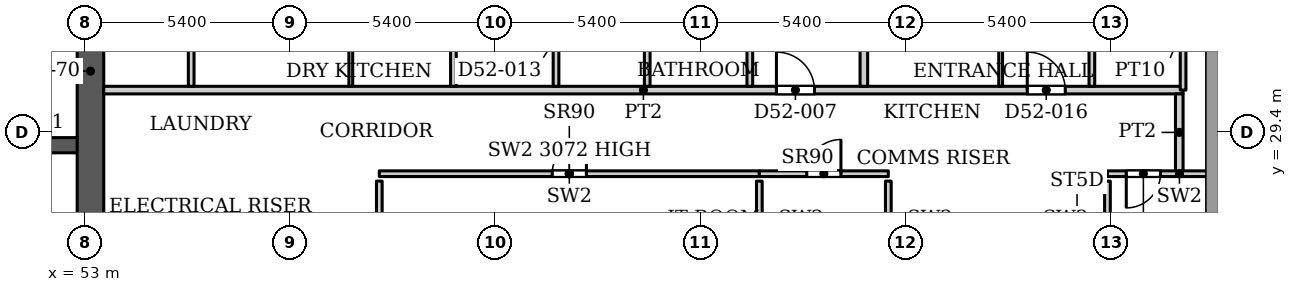
"""IFC4 building model, lengths in metres.
Left out: names, types, materials, properties, quantities, classifications, styles, units other than length and angle.
Written with IfcOpenShell. Run it as: python <this file> out.ifc"""

import sys

from ifc_helpers import new_model, si_unit, direction, frame, frame_2d, origin, place, context, subcontext, project, spatial, rectangle, extrude, source, transform, mapped, element, fill, save


model = new_model("IFC4")
c1 = context("Model", 3, precision=1e-05, world=origin(), true_north=direction((0.0, 1.0)))
c2 = subcontext(c1, "Body", "Model", "MODEL_VIEW")
j1 = project(units=[si_unit("LENGTHUNIT", "METRE"), si_unit("PLANEANGLEUNIT", "RADIAN")], contexts=[c1])
p1 = place(None, origin())
s1 = spatial("IfcSite", under=j1, at=p1, CompositionType="ELEMENT")
p2 = place(p1, origin())
s2 = spatial("IfcBuilding", under=s1, at=p2, CompositionType="ELEMENT")
p3 = place(p2, frame((0.0, 0.0, 224.0)))
s3 = spatial("IfcBuildingStorey", under=s2, at=p3, CompositionType="ELEMENT", Elevation=224.0)
p4 = place(p3, frame((34.75, 29.05, 0.0), z_axis=(0.0, 0.0, 1.0), x_axis=(1.0, 0.0, 0.0)))
e1 = element("IfcWall", 1, at=p4, inside=s3, PredefinedType="SHEAR", context=c2, shape_type="SweptSolid", body=[
    extrude(rectangle(XDim=18.4, YDim=0.4, at=frame_2d((9.2, 0.0))), origin(), (0.0, 0.0, 1.0), 3.9),
])
p5 = place(p4, frame((0.875, 0.0, 0.0)))
e2 = element("IfcOpeningElement", 2, at=p5, cuts=e1, PredefinedType="OPENING", context=c2, shape_type="SweptSolid", body=[
    extrude(rectangle(XDim=1.1, YDim=2.2, at=frame_2d((0.55, 1.1))), frame((0.0, 0.21, 0.0), z_axis=(0.0, -1.0, 0.0), x_axis=(1.0, 0.0, 0.0)), (0.0, 0.0, 1.0), 0.42),
])
p6 = place(p4, frame((3.725, 0.0, 0.0)))
e3 = element("IfcOpeningElement", 3, at=p6, cuts=e1, PredefinedType="OPENING", context=c2, shape_type="SweptSolid", body=[
    extrude(rectangle(XDim=1.1, YDim=2.2, at=frame_2d((0.55, 1.1))), frame((0.0, 0.21, 0.0), z_axis=(0.0, -1.0, 0.0), x_axis=(1.0, 0.0, 0.0)), (0.0, 0.0, 1.0), 0.42),
])
p7 = place(p4, frame((6.575, 0.0, 0.0)))
e4 = element("IfcOpeningElement", 4, at=p7, cuts=e1, PredefinedType="OPENING", context=c2, shape_type="SweptSolid", body=[
    extrude(rectangle(XDim=1.1, YDim=2.2, at=frame_2d((0.55, 1.1))), frame((0.0, 0.21, 0.0), z_axis=(0.0, -1.0, 0.0), x_axis=(1.0, 0.0, 0.0)), (0.0, 0.0, 1.0), 0.42),
])
p8 = place(p4, frame((9.425, 0.0, 0.0)))
e5 = element("IfcOpeningElement", 5, at=p8, cuts=e1, PredefinedType="OPENING", context=c2, shape_type="SweptSolid", body=[
    extrude(rectangle(XDim=1.1, YDim=2.2, at=frame_2d((0.55, 1.1))), frame((0.0, 0.21, 0.0), z_axis=(0.0, -1.0, 0.0), x_axis=(1.0, 0.0, 0.0)), (0.0, 0.0, 1.0), 0.42),
])
p9 = place(p4, frame((12.275, 0.0, 0.0)))
e6 = element("IfcOpeningElement", 6, at=p9, cuts=e1, PredefinedType="OPENING", context=c2, shape_type="SweptSolid", body=[
    extrude(rectangle(XDim=1.1, YDim=2.2, at=frame_2d((0.55, 1.1))), frame((0.0, 0.21, 0.0), z_axis=(0.0, -1.0, 0.0), x_axis=(1.0, 0.0, 0.0)), (0.0, 0.0, 1.0), 0.42),
])
p10 = place(p4, frame((15.125, 0.0, 0.0)))
e7 = element("IfcOpeningElement", 7, at=p10, cuts=e1, PredefinedType="OPENING", context=c2, shape_type="SweptSolid", body=[
    extrude(rectangle(XDim=1.1, YDim=2.2, at=frame_2d((0.55, 1.1))), frame((0.0, 0.21, 0.0), z_axis=(0.0, -1.0, 0.0), x_axis=(1.0, 0.0, 0.0)), (0.0, 0.0, 1.0), 0.42),
])
p11 = place(p3, frame((53.15, 25.8, 0.0), z_axis=(0.0, 0.0, 1.0), x_axis=(0.0, 1.0, 0.0)))
e8 = element("IfcWall", 8, at=p11, inside=s3, PredefinedType="SHEAR", context=c2, shape_type="SweptSolid", body=[
    extrude(rectangle(XDim=10.4, YDim=0.7, at=frame_2d((5.2, 0.0))), origin(), (0.0, 0.0, 1.0), 3.9),
])
p12 = place(p3, frame((60.75, 28.3, 0.0), z_axis=(0.0, 0.0, 1.0), x_axis=(1.0, 0.0, 0.0)))
e9 = element("IfcWall", 9, at=p12, inside=s3, PredefinedType="PARTITIONING", context=c2, shape_type="SweptSolid", body=[
    extrude(rectangle(XDim=10.0, YDim=0.15, at=frame_2d((5.0, 0.0))), origin(), (0.0, 0.0, 1.0), 3.072),
])
p13 = place(p12, frame((4.55, 0.0, 0.0)))
e10 = element("IfcOpeningElement", 10, at=p13, cuts=e9, PredefinedType="OPENING", context=c2, shape_type="SweptSolid", body=[
    extrude(rectangle(XDim=0.9, YDim=2.2, at=frame_2d((0.45, 1.1))), frame((0.0, 0.085, 0.0), z_axis=(0.0, -1.0, 0.0), x_axis=(1.0, 0.0, 0.0)), (0.0, 0.0, 1.0), 0.17),
])
p14 = place(p3, frame((60.75, 23.075, 0.0), z_axis=(0.0, 0.0, 1.0), x_axis=(0.0, 1.0, 0.0)))
e11 = element("IfcWall", 11, at=p14, inside=s3, PredefinedType="PARTITIONING", context=c2, shape_type="SweptSolid", body=[
    extrude(rectangle(XDim=5.03, YDim=0.15, at=frame_2d((2.515, 0.0))), origin(), (0.0, 0.0, 1.0), 3.9),
])
p15 = place(p3, frame((70.75, 26.12, 0.0), z_axis=(0.0, 0.0, 1.0), x_axis=(0.0, 1.0, 0.0)))
e12 = element("IfcWall", 12, at=p15, inside=s3, PredefinedType="PARTITIONING", context=c2, shape_type="SweptSolid", body=[
    extrude(rectangle(XDim=1.985, YDim=0.15, at=frame_2d((0.992, 0.0))), origin(), (0.0, 0.0, 1.0), 3.9),
])
p16 = place(p3, frame((70.75, 28.3, 0.0), z_axis=(0.0, 0.0, 1.0), x_axis=(1.0, 0.0, 0.0)))
e13 = element("IfcWall", 13, at=p16, inside=s3, PredefinedType="PARTITIONING", context=c2, shape_type="SweptSolid", body=[
    extrude(rectangle(XDim=3.394, YDim=0.15, at=frame_2d((1.697, 0.0))), origin(), (0.0, 0.0, 1.0), 3.9),
])
p17 = place(p16, frame((1.247, 0.0, 0.0)))
e14 = element("IfcOpeningElement", 14, at=p17, cuts=e13, PredefinedType="OPENING", context=c2, shape_type="SweptSolid", body=[
    extrude(rectangle(XDim=0.9, YDim=2.2, at=frame_2d((0.45, 1.1))), frame((0.0, 0.085, 0.0), z_axis=(0.0, -1.0, 0.0), x_axis=(1.0, 0.0, 0.0)), (0.0, 0.0, 1.0), 0.17),
])
p18 = place(p3, frame((74.144, 26.12, 0.0), z_axis=(0.0, 0.0, 1.0), x_axis=(0.0, 1.0, 0.0)))
e15 = element("IfcWall", 15, at=p18, inside=s3, PredefinedType="PARTITIONING", context=c2, shape_type="SweptSolid", body=[
    extrude(rectangle(XDim=1.985, YDim=0.15, at=frame_2d((0.992, 0.0))), origin(), (0.0, 0.0, 1.0), 3.9),
])
p19 = place(p3, frame((79.91, 28.3, 0.0), z_axis=(0.0, 0.0, 1.0), x_axis=(1.0, 0.0, 0.0)))
e16 = element("IfcWall", 16, at=p19, inside=s3, PredefinedType="PARTITIONING", context=c2, shape_type="SweptSolid", body=[
    extrude(rectangle(XDim=3.788, YDim=0.15, at=frame_2d((1.894, 0.0))), origin(), (0.0, 0.0, 1.0), 3.9),
])
p20 = place(p19, frame((0.495, 0.0, 0.0)))
e17 = element("IfcOpeningElement", 17, at=p20, cuts=e16, PredefinedType="OPENING", context=c2, shape_type="SweptSolid", body=[
    extrude(rectangle(XDim=0.9, YDim=2.2, at=frame_2d((0.45, 1.1))), frame((0.0, 0.085, 0.0), z_axis=(0.0, -1.0, 0.0), x_axis=(1.0, 0.0, 0.0)), (0.0, 0.0, 1.0), 0.17),
])
p21 = place(p3, frame((79.91, 26.12, 0.0), z_axis=(0.0, 0.0, 1.0), x_axis=(0.0, 1.0, 0.0)))
e18 = element("IfcWall", 18, at=p21, inside=s3, PredefinedType="PARTITIONING", context=c2, shape_type="SweptSolid", body=[
    extrude(rectangle(XDim=1.985, YDim=0.15, at=frame_2d((0.992, 0.0))), origin(), (0.0, 0.0, 1.0), 3.9),
])
p22 = place(p3, frame((53.499, 30.5, 0.0), z_axis=(0.0, 0.0, 1.0), x_axis=(1.0, 0.0, 0.0)))
e19 = element("IfcWall", 19, at=p22, inside=s3, PredefinedType="PARTITIONING", context=c2, shape_type="SweptSolid", body=[
    extrude(rectangle(XDim=28.401, YDim=0.2, at=frame_2d((14.2, 0.0))), origin(), (0.0, 0.0, 1.0), 3.6),
])
p23 = place(p22, frame((17.701, 0.0, 0.0)))
e20 = element("IfcOpeningElement", 20, at=p23, cuts=e19, PredefinedType="OPENING", context=c2, shape_type="SweptSolid", body=[
    extrude(rectangle(XDim=1.0, YDim=2.1, at=frame_2d((0.5, 1.05))), frame((0.0, 0.11, 0.0), z_axis=(0.0, -1.0, 0.0), x_axis=(1.0, 0.0, 0.0)), (0.0, 0.0, 1.0), 0.22),
])
p24 = place(p22, frame((24.301, 0.0, 0.0)))
e21 = element("IfcOpeningElement", 21, at=p24, cuts=e19, PredefinedType="OPENING", context=c2, shape_type="SweptSolid", body=[
    extrude(rectangle(XDim=1.0, YDim=2.1, at=frame_2d((0.5, 1.05))), frame((0.0, 0.11, 0.0), z_axis=(0.0, -1.0, 0.0), x_axis=(1.0, 0.0, 0.0)), (0.0, 0.0, 1.0), 0.22),
])
p25 = place(p3, frame((55.8, 30.6, 0.0), z_axis=(0.0, 0.0, 1.0), x_axis=(0.0, 1.0, 0.0)))
e22 = element("IfcWall", 22, at=p25, inside=s3, PredefinedType="PARTITIONING", context=c2, shape_type="SweptSolid", body=[
    extrude(rectangle(XDim=3.025, YDim=0.15, at=frame_2d((1.512, 0.0))), origin(), (0.0, 0.0, 1.0), 3.6),
])
p26 = place(p3, frame((60.0, 30.6, 0.0), z_axis=(0.0, 0.0, 1.0), x_axis=(0.0, 1.0, 0.0)))
e23 = element("IfcWall", 23, at=p26, inside=s3, PredefinedType="PARTITIONING", context=c2, shape_type="SweptSolid", body=[
    extrude(rectangle(XDim=3.025, YDim=0.1, at=frame_2d((1.512, 0.0))), origin(), (0.0, 0.0, 1.0), 3.6),
])
for number, where, z_axis, x_axis in (
    (24, (62.7, 30.6, 0.0), (0.0, 0.0, 1.0), (0.0, 1.0, 0.0)),
    (25, (65.4, 30.6, 0.0), (0.0, 0.0, 1.0), (0.0, 1.0, 0.0)),
    (26, (67.8, 30.6, 0.0), (0.0, 0.0, 1.0), (0.0, 1.0, 0.0)),
    (27, (70.5, 30.6, 0.0), (0.0, 0.0, 1.0), (0.0, 1.0, 0.0)),
):
    element("IfcWall", number, at=place(p3, frame(where, z_axis=z_axis, x_axis=x_axis)), inside=s3, PredefinedType="PARTITIONING", context=c2, shape_type="SweptSolid", body=[
        extrude(rectangle(XDim=3.025, YDim=0.15, at=frame_2d((1.512, 0.0))), origin(), (0.0, 0.0, 1.0), 3.6),
    ])
p27 = place(p3, frame((73.5, 30.6, 0.0), z_axis=(0.0, 0.0, 1.0), x_axis=(0.0, 1.0, 0.0)))
e28 = element("IfcWall", 28, at=p27, inside=s3, PredefinedType="PARTITIONING", context=c2, shape_type="SweptSolid", body=[
    extrude(rectangle(XDim=13.3, YDim=0.2, at=frame_2d((6.65, 0.0))), origin(), (0.0, 0.0, 1.0), 3.6),
])
p28 = place(p3, frame((77.1, 30.6, 0.0), z_axis=(0.0, 0.0, 1.0), x_axis=(0.0, 1.0, 0.0)))
e29 = element("IfcWall", 29, at=p28, inside=s3, PredefinedType="PARTITIONING", context=c2, shape_type="SweptSolid", body=[
    extrude(rectangle(XDim=3.05, YDim=0.1, at=frame_2d((1.525, 0.0))), origin(), (0.0, 0.0, 1.0), 3.6),
])
p29 = place(p3, frame((79.5, 30.6, 0.0), z_axis=(0.0, 0.0, 1.0), x_axis=(0.0, 1.0, 0.0)))
e30 = element("IfcWall", 30, at=p29, inside=s3, PredefinedType="PARTITIONING", context=c2, shape_type="SweptSolid", body=[
    extrude(rectangle(XDim=3.175, YDim=0.15, at=frame_2d((1.587, 0.0))), origin(), (0.0, 0.0, 1.0), 3.6),
])
p30 = place(p3, frame((81.8, 28.374, 0.0), z_axis=(0.0, 0.0, 1.0), x_axis=(0.0, 1.0, 0.0)))
e31 = element("IfcWall", 31, at=p30, inside=s3, PredefinedType="PARTITIONING", context=c2, shape_type="SweptSolid", body=[
    extrude(rectangle(XDim=2.026, YDim=0.2, at=frame_2d((1.013, 0.0))), origin(), (0.0, 0.0, 1.0), 3.6),
])
p31 = place(p3, frame((81.9, 30.5, 0.0), z_axis=(0.0, 0.0, 1.0), x_axis=(0.0, 1.0, 0.0)))
e32 = element("IfcWall", 32, at=p31, inside=s3, PredefinedType="PARTITIONING", context=c2, shape_type="SweptSolid", body=[
    extrude(rectangle(XDim=3.275, YDim=0.15, at=frame_2d((1.637, 0.0))), origin(), (0.0, 0.0, 1.0), 3.6),
])
m1 = source(origin(), c2, "Body", "SweptSolid", [
    extrude(rectangle(XDim=0.9, YDim=2.2, at=frame_2d((0.45, 1.1))), frame((0.0, 0.025, 0.0), z_axis=(0.0, -1.0, 0.0), x_axis=(1.0, 0.0, 0.0)), (0.0, 0.0, 1.0), 0.05),
])
p32 = place(p13, origin())
e33 = element("IfcDoor", 33, at=p32, inside=s3, OperationType="SINGLE_SWING_LEFT", PredefinedType="DOOR", context=c2, shape_type="MappedRepresentation", body=[
    mapped(m1, transform((0.0, 0.0, 0.0), x_axis=(1.0, 0.0, 0.0), y_axis=(0.0, 1.0, 0.0), z_axis=(0.0, 0.0, 1.0), scale=1.0)),
])
fill(e10, e33)
p33 = place(p17, origin())
e34 = element("IfcDoor", 34, at=p33, inside=s3, OperationType="SINGLE_SWING_LEFT", PredefinedType="DOOR", context=c2, shape_type="MappedRepresentation", body=[
    mapped(m1, transform((0.0, 0.0, 0.0), x_axis=(1.0, 0.0, 0.0), y_axis=(0.0, 1.0, 0.0), z_axis=(0.0, 0.0, 1.0), scale=1.0)),
])
fill(e14, e34)
p34 = place(p20, origin())
e35 = element("IfcDoor", 35, at=p34, inside=s3, OperationType="SINGLE_SWING_RIGHT", PredefinedType="DOOR", context=c2, shape_type="MappedRepresentation", body=[
    mapped(m1, transform((0.0, 0.0, 0.0), x_axis=(1.0, 0.0, 0.0), y_axis=(0.0, 1.0, 0.0), z_axis=(0.0, 0.0, 1.0), scale=1.0)),
])
fill(e17, e35)
m2 = source(origin(), c2, "Body", "SweptSolid", [
    extrude(rectangle(XDim=1.0, YDim=2.1, at=frame_2d((0.5, 1.05))), frame((0.0, 0.025, 0.0), z_axis=(0.0, -1.0, 0.0), x_axis=(1.0, 0.0, 0.0)), (0.0, 0.0, 1.0), 0.05),
])
p35 = place(p23, origin())
e36 = element("IfcDoor", 36, at=p35, inside=s3, OperationType="SINGLE_SWING_LEFT", PredefinedType="DOOR", context=c2, shape_type="MappedRepresentation", body=[
    mapped(m2, transform((0.0, 0.0, 0.0), x_axis=(1.0, 0.0, 0.0), y_axis=(0.0, 1.0, 0.0), z_axis=(0.0, 0.0, 1.0), scale=1.0)),
])
fill(e20, e36)
p36 = place(p24, origin())
e37 = element("IfcDoor", 37, at=p36, inside=s3, OperationType="SINGLE_SWING_LEFT", PredefinedType="DOOR", context=c2, shape_type="MappedRepresentation", body=[
    mapped(m2, transform((0.0, 0.0, 0.0), x_axis=(1.0, 0.0, 0.0), y_axis=(0.0, 1.0, 0.0), z_axis=(0.0, 0.0, 1.0), scale=1.0)),
])
fill(e21, e37)
save(model, sys.argv[1])
